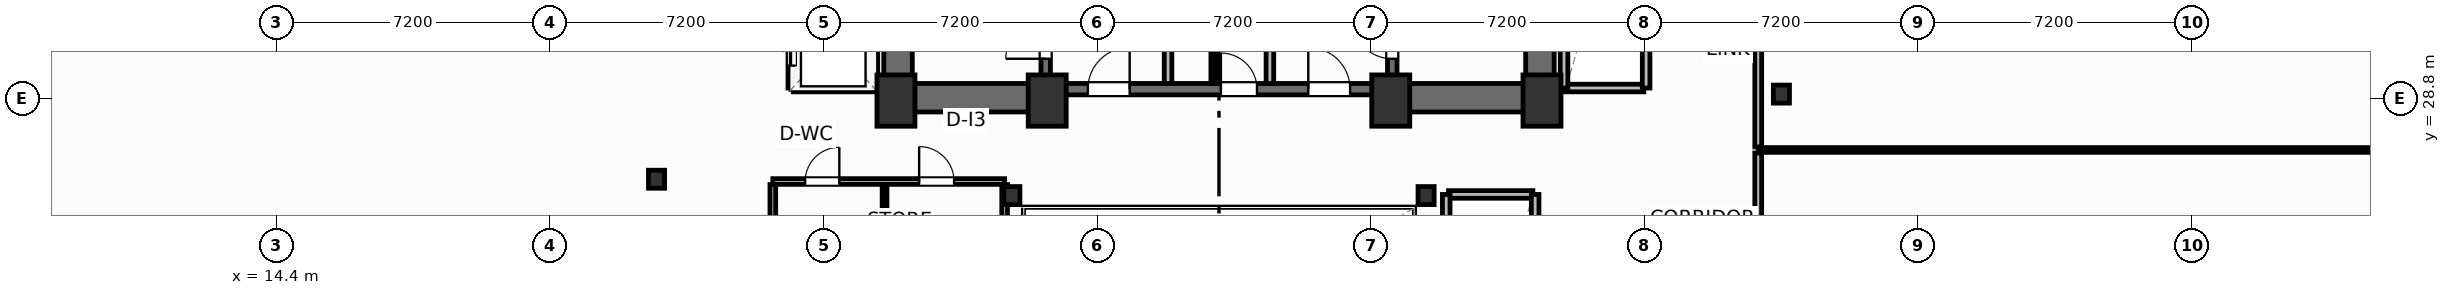
"""IFC4 building model, lengths in metres.
Left out: names, types, materials, properties, quantities, classifications, styles, units other than length and angle.
Written with IfcOpenShell. Run it as: python <this file> out.ifc"""

import sys

from ifc_helpers import new_model, si_unit, direction, frame, frame_2d, origin, origin_2d, place, context, subcontext, project, spatial, rectangle, i_section, extrude, element, fill, save


model = new_model("IFC4")
c1 = context("Model", 3, precision=1e-05, world=origin(), true_north=direction((0.0, 1.0)))
c2 = subcontext(c1, "Body", "Model", "MODEL_VIEW")
j1 = project(units=[si_unit("LENGTHUNIT", "METRE"), si_unit("PLANEANGLEUNIT", "RADIAN")], contexts=[c1])
p1 = place(None, origin())
s1 = spatial("IfcSite", under=j1, at=p1, CompositionType="ELEMENT")
p2 = place(p1, origin())
s2 = spatial("IfcBuilding", under=s1, at=p2, CompositionType="ELEMENT")
p3 = place(p2, frame((0.0, 0.0, 113.2)))
s3 = spatial("IfcBuildingStorey", under=s2, at=p3, CompositionType="ELEMENT", Elevation=113.2)
for number, where, z_axis, x_axis in (
    (1, (30.7, 28.75, 0.0), (0.0, 0.0, 1.0), (1.0, 0.0, 0.0)),
    (2, (34.68, 28.75, 0.0), (0.0, 0.0, 1.0), (1.0, 0.0, 0.0)),
    (3, (43.72, 28.75, 0.0), (0.0, 0.0, 1.0), (1.0, 0.0, 0.0)),
    (4, (47.7, 28.75, 0.0), (0.0, 0.0, 1.0), (1.0, 0.0, 0.0)),
):
    element("IfcColumn", number, at=place(p3, frame(where, z_axis=z_axis, x_axis=x_axis)), inside=s3, PredefinedType="COLUMN", context=c2, shape_type="SweptSolid", body=[
        extrude(rectangle(XDim=1.0, YDim=1.35, at=origin_2d()), origin(), (0.0, 0.0, 1.0), 3.7),
    ])
for number, where, z_axis, x_axis in (
    (5, (33.75, 26.25, 0.0), (0.0, 0.0, 1.0), (1.0, 0.0, 0.0)),
    (6, (44.65, 26.25, 0.0), (0.0, 0.0, 1.0), (1.0, 0.0, 0.0)),
    (7, (24.4, 26.68, 0.0), (0.0, 0.0, 1.0), (1.0, 0.0, 0.0)),
    (8, (54.0, 28.92, 0.0), (0.0, 0.0, 1.0), (1.0, 0.0, 0.0)),
):
    element("IfcColumn", number, at=place(p3, frame(where, z_axis=z_axis, x_axis=x_axis)), inside=s3, PredefinedType="COLUMN", context=c2, shape_type="SweptSolid", body=[
        extrude(i_section(OverallWidth=0.424, OverallDepth=0.474, WebThickness=0.048, FlangeThickness=0.077, FilletRadius=0.025, at=origin_2d()), origin(), (0.0, 0.0, 1.0), 3.7),
    ])
for number, where, z_axis, x_axis in (
    (9, (30.755, 29.2, 0.0), (0.0, 0.0, 1.0), (0.0, 1.0, 0.0)),
    (10, (47.645, 29.2, 0.0), (0.0, 0.0, 1.0), (0.0, 1.0, 0.0)),
):
    element("IfcWall", number, at=place(p3, frame(where, z_axis=z_axis, x_axis=x_axis)), inside=s3, PredefinedType="SHEAR", context=c2, shape_type="SweptSolid", body=[
        extrude(rectangle(XDim=9.22, YDim=0.75, at=frame_2d((4.61, 0.0))), origin(), (0.0, 0.0, 1.0), 3.38),
    ])
p4 = place(p3, frame((30.38, 28.825, 0.0), z_axis=(0.0, 0.0, 1.0), x_axis=(1.0, 0.0, 0.0)))
e11 = element("IfcWall", 11, at=p4, inside=s3, PredefinedType="SHEAR", context=c2, shape_type="SweptSolid", body=[
    extrude(rectangle(XDim=4.42, YDim=0.75, at=frame_2d((2.21, 0.0))), origin(), (0.0, 0.0, 1.0), 3.38),
])
p5 = place(p3, frame((43.6, 28.825, 0.0), z_axis=(0.0, 0.0, 1.0), x_axis=(1.0, 0.0, 0.0)))
e12 = element("IfcWall", 12, at=p5, inside=s3, PredefinedType="SHEAR", context=c2, shape_type="SweptSolid", body=[
    extrude(rectangle(XDim=4.42, YDim=0.75, at=frame_2d((2.21, 0.0))), origin(), (0.0, 0.0, 1.0), 3.38),
])
p6 = place(p3, frame((34.8, 29.05, 0.0), z_axis=(0.0, 0.0, 1.0), x_axis=(1.0, 0.0, 0.0)))
e13 = element("IfcWall", 13, at=p6, inside=s3, PredefinedType="SHEAR", context=c2, shape_type="SweptSolid", body=[
    extrude(rectangle(XDim=8.8, YDim=0.3, at=frame_2d((4.4, 0.0))), origin(), (0.0, 0.0, 1.0), 3.38),
])
p7 = place(p6, frame((0.95, 0.0, 0.0)))
e14 = element("IfcOpeningElement", 14, at=p7, cuts=e13, PredefinedType="OPENING", context=c2, shape_type="SweptSolid", body=[
    extrude(rectangle(XDim=1.1, YDim=2.15, at=frame_2d((0.55, 1.075))), frame((0.0, 0.16, 0.0), z_axis=(0.0, -1.0, 0.0), x_axis=(1.0, 0.0, 0.0)), (0.0, 0.0, 1.0), 0.32),
])
p8 = place(p6, frame((6.75, 0.0, 0.0)))
e15 = element("IfcOpeningElement", 15, at=p8, cuts=e13, PredefinedType="OPENING", context=c2, shape_type="SweptSolid", body=[
    extrude(rectangle(XDim=1.1, YDim=2.15, at=frame_2d((0.55, 1.075))), frame((0.0, 0.16, 0.0), z_axis=(0.0, -1.0, 0.0), x_axis=(1.0, 0.0, 0.0)), (0.0, 0.0, 1.0), 0.32),
])
p9 = place(p6, frame((4.45, 0.0, 0.0)))
e16 = element("IfcOpeningElement", 16, at=p9, cuts=e13, PredefinedType="OPENING", context=c2, shape_type="SweptSolid", body=[
    extrude(rectangle(XDim=0.95, YDim=2.15, at=frame_2d((0.475, 1.075))), frame((0.0, 0.16, 0.0), z_axis=(0.0, -1.0, 0.0), x_axis=(1.0, 0.0, 0.0)), (0.0, 0.0, 1.0), 0.32),
])
p10 = place(p3, frame((34.64, 29.2, 0.0), z_axis=(0.0, 0.0, 1.0), x_axis=(0.0, 1.0, 0.0)))
e17 = element("IfcWall", 17, at=p10, inside=s3, PredefinedType="SHEAR", context=c2, shape_type="SweptSolid", body=[
    extrude(rectangle(XDim=9.22, YDim=0.25, at=frame_2d((4.61, 0.0))), origin(), (0.0, 0.0, 1.0), 3.38),
])
p11 = place(p10, frame((0.65, 0.0, 0.0)))
e18 = element("IfcOpeningElement", 18, at=p11, cuts=e17, PredefinedType="OPENING", context=c2, shape_type="SweptSolid", body=[
    extrude(rectangle(XDim=1.05, YDim=2.15, at=frame_2d((0.525, 1.075))), frame((0.0, 0.135, 0.0), z_axis=(0.0, -1.0, 0.0), x_axis=(1.0, 0.0, 0.0)), (0.0, 0.0, 1.0), 0.27),
])
p12 = place(p3, frame((43.76, 29.2, 0.0), z_axis=(0.0, 0.0, 1.0), x_axis=(0.0, 1.0, 0.0)))
e19 = element("IfcWall", 19, at=p12, inside=s3, PredefinedType="SHEAR", context=c2, shape_type="SweptSolid", body=[
    extrude(rectangle(XDim=9.22, YDim=0.25, at=frame_2d((4.61, 0.0))), origin(), (0.0, 0.0, 1.0), 3.38),
])
p13 = place(p12, frame((0.65, 0.0, 0.0)))
e20 = element("IfcOpeningElement", 20, at=p13, cuts=e19, PredefinedType="OPENING", context=c2, shape_type="SweptSolid", body=[
    extrude(rectangle(XDim=1.05, YDim=2.15, at=frame_2d((0.525, 1.075))), frame((0.0, 0.135, 0.0), z_axis=(0.0, -1.0, 0.0), x_axis=(1.0, 0.0, 0.0)), (0.0, 0.0, 1.0), 0.27),
])
p14 = place(p3, frame((53.39, 19.3, 0.0), z_axis=(0.0, 0.0, 1.0), x_axis=(0.0, 1.0, 0.0)))
e21 = element("IfcWall", 21, at=p14, inside=s3, PredefinedType="PARTITIONING", context=c2, shape_type="SweptSolid", body=[
    extrude(rectangle(XDim=8.07, YDim=0.18, at=frame_2d((4.035, 0.0))), origin(), (0.0, 0.0, 1.0), 3.38),
])
p15 = place(p14, frame((2.2, 0.0, 0.0)))
e22 = element("IfcOpeningElement", 22, at=p15, cuts=e21, PredefinedType="OPENING", context=c2, shape_type="SweptSolid", body=[
    extrude(rectangle(XDim=0.92, YDim=2.05, at=frame_2d((0.46, 1.025))), frame((0.0, 0.1, 0.0), z_axis=(0.0, -1.0, 0.0), x_axis=(1.0, 0.0, 0.0)), (0.0, 0.0, 1.0), 0.2),
])
p16 = place(p3, frame((53.39, 27.53, 0.0), z_axis=(0.0, 0.0, 1.0), x_axis=(0.0, 1.0, 0.0)))
e23 = element("IfcWall", 23, at=p16, inside=s3, PredefinedType="PARTITIONING", context=c2, shape_type="SweptSolid", body=[
    extrude(rectangle(XDim=11.67, YDim=0.18, at=frame_2d((5.835, 0.0))), origin(), (0.0, 0.0, 1.0), 3.38),
])
p17 = place(p16, frame((5.8, 0.0, 0.0)))
e24 = element("IfcOpeningElement", 24, at=p17, cuts=e23, PredefinedType="OPENING", context=c2, shape_type="SweptSolid", body=[
    extrude(rectangle(XDim=0.92, YDim=2.05, at=frame_2d((0.46, 1.025))), frame((0.0, 0.1, 0.0), z_axis=(0.0, -1.0, 0.0), x_axis=(1.0, 0.0, 0.0)), (0.0, 0.0, 1.0), 0.2),
])
p18 = place(p3, frame((53.39, 27.45, 0.0), z_axis=(0.0, 0.0, 1.0), x_axis=(1.0, 0.0, 0.0)))
e25 = element("IfcWall", 25, at=p18, inside=s3, PredefinedType="PARTITIONING", context=c2, shape_type="SweptSolid", body=[
    extrude(rectangle(XDim=23.61, YDim=0.125, at=frame_2d((11.805, 0.0))), origin(), (0.0, 0.0, 1.0), 3.38),
])
for number, where, z_axis, x_axis in (
    (26, (37.86, 29.2, 0.0), (0.0, 0.0, 1.0), (0.0, 1.0, 0.0)),
    (27, (40.54, 29.2, 0.0), (0.0, 0.0, 1.0), (0.0, 1.0, 0.0)),
):
    element("IfcWall", number, at=place(p3, frame(where, z_axis=z_axis, x_axis=x_axis)), inside=s3, PredefinedType="PARTITIONING", context=c2, shape_type="SweptSolid", body=[
        extrude(rectangle(XDim=5.18, YDim=0.2, at=frame_2d((2.59, 0.0))), origin(), (0.0, 0.0, 1.0), 3.38),
    ])
p19 = place(p3, frame((39.05, 29.2, 0.0), z_axis=(0.0, 0.0, 1.0), x_axis=(0.0, 1.0, 0.0)))
e28 = element("IfcWall", 28, at=p19, inside=s3, PredefinedType="PARTITIONING", context=c2, shape_type="SweptSolid", body=[
    extrude(rectangle(XDim=5.22, YDim=0.125, at=frame_2d((2.61, 0.0))), origin(), (0.0, 0.0, 1.0), 3.38),
])
p20 = place(p19, frame((2.05, 0.0, 0.0)))
e29 = element("IfcOpeningElement", 29, at=p20, cuts=e28, PredefinedType="OPENING", context=c2, shape_type="SweptSolid", body=[
    extrude(rectangle(XDim=0.85, YDim=2.05, at=frame_2d((0.425, 1.025))), frame((0.0, 0.073, 0.0), z_axis=(0.0, -1.0, 0.0), x_axis=(1.0, 0.0, 0.0)), (0.0, 0.0, 1.0), 0.145),
])
p21 = place(p3, frame((27.46, 26.62, 0.0), z_axis=(0.0, 0.0, 1.0), x_axis=(1.0, 0.0, 0.0)))
e30 = element("IfcWall", 30, at=p21, inside=s3, PredefinedType="PARTITIONING", context=c2, shape_type="SweptSolid", body=[
    extrude(rectangle(XDim=6.1, YDim=0.15, at=frame_2d((3.05, 0.0))), origin(), (0.0, 0.0, 1.0), 2.592),
])
p22 = place(p21, frame((0.85, 0.0, 0.0)))
e31 = element("IfcOpeningElement", 31, at=p22, cuts=e30, PredefinedType="OPENING", context=c2, shape_type="SweptSolid", body=[
    extrude(rectangle(XDim=0.9, YDim=2.05, at=frame_2d((0.45, 1.025))), frame((0.0, 0.085, 0.0), z_axis=(0.0, -1.0, 0.0), x_axis=(1.0, 0.0, 0.0)), (0.0, 0.0, 1.0), 0.17),
])
p23 = place(p21, frame((3.85, 0.0, 0.0)))
e32 = element("IfcOpeningElement", 32, at=p23, cuts=e30, PredefinedType="OPENING", context=c2, shape_type="SweptSolid", body=[
    extrude(rectangle(XDim=0.92, YDim=2.05, at=frame_2d((0.46, 1.025))), frame((0.0, 0.085, 0.0), z_axis=(0.0, -1.0, 0.0), x_axis=(1.0, 0.0, 0.0)), (0.0, 0.0, 1.0), 0.17),
])
p24 = place(p3, frame((30.4, 23.0, 0.0), z_axis=(0.0, 0.0, 1.0), x_axis=(0.0, 1.0, 0.0)))
e33 = element("IfcWall", 33, at=p24, inside=s3, PredefinedType="PARTITIONING", context=c2, shape_type="SweptSolid", body=[
    extrude(rectangle(XDim=3.54, YDim=0.125, at=frame_2d((1.77, 0.0))), origin(), (0.0, 0.0, 1.0), 3.38),
])
p25 = place(p3, frame((27.46, 19.38, 0.0), z_axis=(0.0, 0.0, 1.0), x_axis=(0.0, 1.0, 0.0)))
e34 = element("IfcWall", 34, at=p25, inside=s3, PredefinedType="PARTITIONING", context=c2, shape_type="SweptSolid", body=[
    extrude(rectangle(XDim=7.16, YDim=0.15, at=frame_2d((3.58, 0.0))), origin(), (0.0, 0.0, 1.0), 3.38),
])
p26 = place(p25, frame((1.1, 0.0, 0.0)))
e35 = element("IfcOpeningElement", 35, at=p26, cuts=e34, PredefinedType="OPENING", context=c2, shape_type="SweptSolid", body=[
    extrude(rectangle(XDim=0.95, YDim=2.05, at=frame_2d((0.475, 1.025))), frame((0.0, 0.085, 0.0), z_axis=(0.0, -1.0, 0.0), x_axis=(1.0, 0.0, 0.0)), (0.0, 0.0, 1.0), 0.17),
])
p27 = place(p3, frame((33.56, 19.38, 0.0), z_axis=(0.0, 0.0, 1.0), x_axis=(0.0, 1.0, 0.0)))
e36 = element("IfcWall", 36, at=p27, inside=s3, PredefinedType="PARTITIONING", context=c2, shape_type="SweptSolid", body=[
    extrude(rectangle(XDim=7.16, YDim=0.15, at=frame_2d((3.58, 0.0))), origin(), (0.0, 0.0, 1.0), 1.165),
])
p28 = place(p3, frame((28.0, 29.08, 0.0), z_axis=(0.0, 0.0, 1.0), x_axis=(1.0, 0.0, 0.0)))
e37 = element("IfcWall", 37, at=p28, inside=s3, PredefinedType="PARTITIONING", context=c2, shape_type="SweptSolid", body=[
    extrude(rectangle(XDim=2.1, YDim=0.2, at=frame_2d((1.05, 0.0))), origin(), (0.0, 0.0, 1.0), 3.38),
])
p29 = place(p3, frame((30.12, 29.08, 0.0), z_axis=(0.0, 0.0, 1.0), x_axis=(0.0, 1.0, 0.0)))
e38 = element("IfcWall", 38, at=p29, inside=s3, PredefinedType="PARTITIONING", context=c2, shape_type="SweptSolid", body=[
    extrude(rectangle(XDim=6.89, YDim=0.2, at=frame_2d((3.445, 0.0))), origin(), (0.0, 0.0, 1.0), 3.38),
])
p30 = place(p3, frame((27.96, 29.08, 0.0), z_axis=(0.0, 0.0, 1.0), x_axis=(0.0, 1.0, 0.0)))
e39 = element("IfcWall", 39, at=p30, inside=s3, PredefinedType="PARTITIONING", context=c2, shape_type="SweptSolid", body=[
    extrude(rectangle(XDim=6.89, YDim=0.2, at=frame_2d((3.445, 0.0))), origin(), (0.0, 0.0, 1.0), 3.38),
])
p31 = place(p30, frame((0.59, 0.0, 0.0)))
e40 = element("IfcOpeningElement", 40, at=p31, cuts=e39, PredefinedType="OPENING", context=c2, shape_type="SweptSolid", body=[
    extrude(rectangle(XDim=1.1, YDim=2.15, at=frame_2d((0.55, 1.075))), frame((0.0, 0.11, 0.0), z_axis=(0.0, -1.0, 0.0), x_axis=(1.0, 0.0, 0.0)), (0.0, 0.0, 1.0), 0.22),
])
p32 = place(p30, frame((2.89, 0.0, 0.0)))
e41 = element("IfcOpeningElement", 41, at=p32, cuts=e39, PredefinedType="OPENING", context=c2, shape_type="SweptSolid", body=[
    extrude(rectangle(XDim=1.1, YDim=2.15, at=frame_2d((0.55, 1.075))), frame((0.0, 0.11, 0.0), z_axis=(0.0, -1.0, 0.0), x_axis=(1.0, 0.0, 0.0)), (0.0, 0.0, 1.0), 0.22),
])
p33 = place(p30, frame((5.19, 0.0, 0.0)))
e42 = element("IfcOpeningElement", 42, at=p33, cuts=e39, PredefinedType="OPENING", context=c2, shape_type="SweptSolid", body=[
    extrude(rectangle(XDim=1.1, YDim=2.15, at=frame_2d((0.55, 1.075))), frame((0.0, 0.11, 0.0), z_axis=(0.0, -1.0, 0.0), x_axis=(1.0, 0.0, 0.0)), (0.0, 0.0, 1.0), 0.22),
])
p34 = place(p3, frame((48.32, 29.08, 0.0), z_axis=(0.0, 0.0, 1.0), x_axis=(1.0, 0.0, 0.0)))
e43 = element("IfcWall", 43, at=p34, inside=s3, PredefinedType="PARTITIONING", context=c2, shape_type="SweptSolid", body=[
    extrude(rectangle(XDim=2.06, YDim=0.2, at=frame_2d((1.03, 0.0))), origin(), (0.0, 0.0, 1.0), 2.592),
])
for number, where, z_axis, x_axis in (
    (44, (48.28, 29.08, 0.0), (0.0, 0.0, 1.0), (0.0, 1.0, 0.0)),
    (45, (50.44, 29.08, 0.0), (0.0, 0.0, 1.0), (0.0, 1.0, 0.0)),
):
    element("IfcWall", number, at=place(p3, frame(where, z_axis=z_axis, x_axis=x_axis)), inside=s3, PredefinedType="PARTITIONING", context=c2, shape_type="SweptSolid", body=[
        extrude(rectangle(XDim=6.89, YDim=0.2, at=frame_2d((3.445, 0.0))), origin(), (0.0, 0.0, 1.0), 3.38),
    ])
p35 = place(p3, frame((45.24, 26.28, 0.0), z_axis=(0.0, 0.0, 1.0), x_axis=(1.0, 0.0, 0.0)))
e46 = element("IfcWall", 46, at=p35, inside=s3, PredefinedType="PARTITIONING", context=c2, shape_type="SweptSolid", body=[
    extrude(rectangle(XDim=2.22, YDim=0.2, at=frame_2d((1.11, 0.0))), origin(), (0.0, 0.0, 1.0), 3.38),
])
for number, where, z_axis, x_axis in (
    (47, (45.18, 19.38, 0.0), (0.0, 0.0, 1.0), (0.0, 1.0, 0.0)),
    (48, (47.52, 19.38, 0.0), (0.0, 0.0, 1.0), (0.0, 1.0, 0.0)),
):
    element("IfcWall", number, at=place(p3, frame(where, z_axis=z_axis, x_axis=x_axis)), inside=s3, PredefinedType="PARTITIONING", context=c2, shape_type="SweptSolid", body=[
        extrude(rectangle(XDim=6.9, YDim=0.2, at=frame_2d((3.45, 0.0))), origin(), (0.0, 0.0, 1.0), 3.38),
    ])
p36 = place(p11, origin())
e49 = element("IfcDoor", 49, at=p36, inside=s3, OperationType="SINGLE_SWING_LEFT", PredefinedType="DOOR", context=c2, shape_type="SweptSolid", body=[
    extrude(rectangle(XDim=1.05, YDim=2.15, at=frame_2d((0.525, 1.075))), frame((0.0, 0.025, 0.0), z_axis=(0.0, -1.0, 0.0), x_axis=(1.0, 0.0, 0.0)), (0.0, 0.0, 1.0), 0.05),
])
fill(e18, e49)
p37 = place(p13, origin())
e50 = element("IfcDoor", 50, at=p37, inside=s3, OperationType="SINGLE_SWING_RIGHT", PredefinedType="DOOR", context=c2, shape_type="SweptSolid", body=[
    extrude(rectangle(XDim=1.05, YDim=2.15, at=frame_2d((0.525, 1.075))), frame((0.0, 0.025, 0.0), z_axis=(0.0, -1.0, 0.0), x_axis=(1.0, 0.0, 0.0)), (0.0, 0.0, 1.0), 0.05),
])
fill(e20, e50)
p38 = place(p7, origin())
e51 = element("IfcDoor", 51, at=p38, inside=s3, OperationType="SINGLE_SWING_RIGHT", PredefinedType="DOOR", context=c2, shape_type="SweptSolid", body=[
    extrude(rectangle(XDim=1.1, YDim=2.15, at=frame_2d((0.55, 1.075))), frame((0.0, 0.025, 0.0), z_axis=(0.0, -1.0, 0.0), x_axis=(1.0, 0.0, 0.0)), (0.0, 0.0, 1.0), 0.05),
])
fill(e14, e51)
p39 = place(p8, origin())
e52 = element("IfcDoor", 52, at=p39, inside=s3, OperationType="SINGLE_SWING_LEFT", PredefinedType="DOOR", context=c2, shape_type="SweptSolid", body=[
    extrude(rectangle(XDim=1.1, YDim=2.15, at=frame_2d((0.55, 1.075))), frame((0.0, 0.025, 0.0), z_axis=(0.0, -1.0, 0.0), x_axis=(1.0, 0.0, 0.0)), (0.0, 0.0, 1.0), 0.05),
])
fill(e15, e52)
p40 = place(p9, origin())
e53 = element("IfcDoor", 53, at=p40, inside=s3, OperationType="SINGLE_SWING_LEFT", PredefinedType="DOOR", context=c2, shape_type="SweptSolid", body=[
    extrude(rectangle(XDim=0.95, YDim=2.15, at=frame_2d((0.475, 1.075))), frame((0.0, 0.025, 0.0), z_axis=(0.0, -1.0, 0.0), x_axis=(1.0, 0.0, 0.0)), (0.0, 0.0, 1.0), 0.05),
])
fill(e16, e53)
p41 = place(p22, origin())
e54 = element("IfcDoor", 54, at=p41, inside=s3, OperationType="SINGLE_SWING_RIGHT", PredefinedType="DOOR", context=c2, shape_type="SweptSolid", body=[
    extrude(rectangle(XDim=0.9, YDim=2.05, at=frame_2d((0.45, 1.025))), frame((0.0, 0.025, 0.0), z_axis=(0.0, -1.0, 0.0), x_axis=(1.0, 0.0, 0.0)), (0.0, 0.0, 1.0), 0.05),
])
fill(e31, e54)
p42 = place(p23, origin())
e55 = element("IfcDoor", 55, at=p42, inside=s3, OperationType="SINGLE_SWING_LEFT", PredefinedType="DOOR", context=c2, shape_type="SweptSolid", body=[
    extrude(rectangle(XDim=0.92, YDim=2.05, at=frame_2d((0.46, 1.025))), frame((0.0, 0.025, 0.0), z_axis=(0.0, -1.0, 0.0), x_axis=(1.0, 0.0, 0.0)), (0.0, 0.0, 1.0), 0.05),
])
fill(e32, e55)
p43 = place(p31, origin())
e56 = element("IfcDoor", 56, at=p43, inside=s3, OperationType="SLIDING_TO_LEFT", PredefinedType="DOOR", context=c2, shape_type="SweptSolid", body=[
    extrude(rectangle(XDim=1.1, YDim=2.15, at=frame_2d((0.55, 1.075))), frame((0.0, 0.025, 0.0), z_axis=(0.0, -1.0, 0.0), x_axis=(1.0, 0.0, 0.0)), (0.0, 0.0, 1.0), 0.05),
])
fill(e40, e56)
save(model, sys.argv[1])
